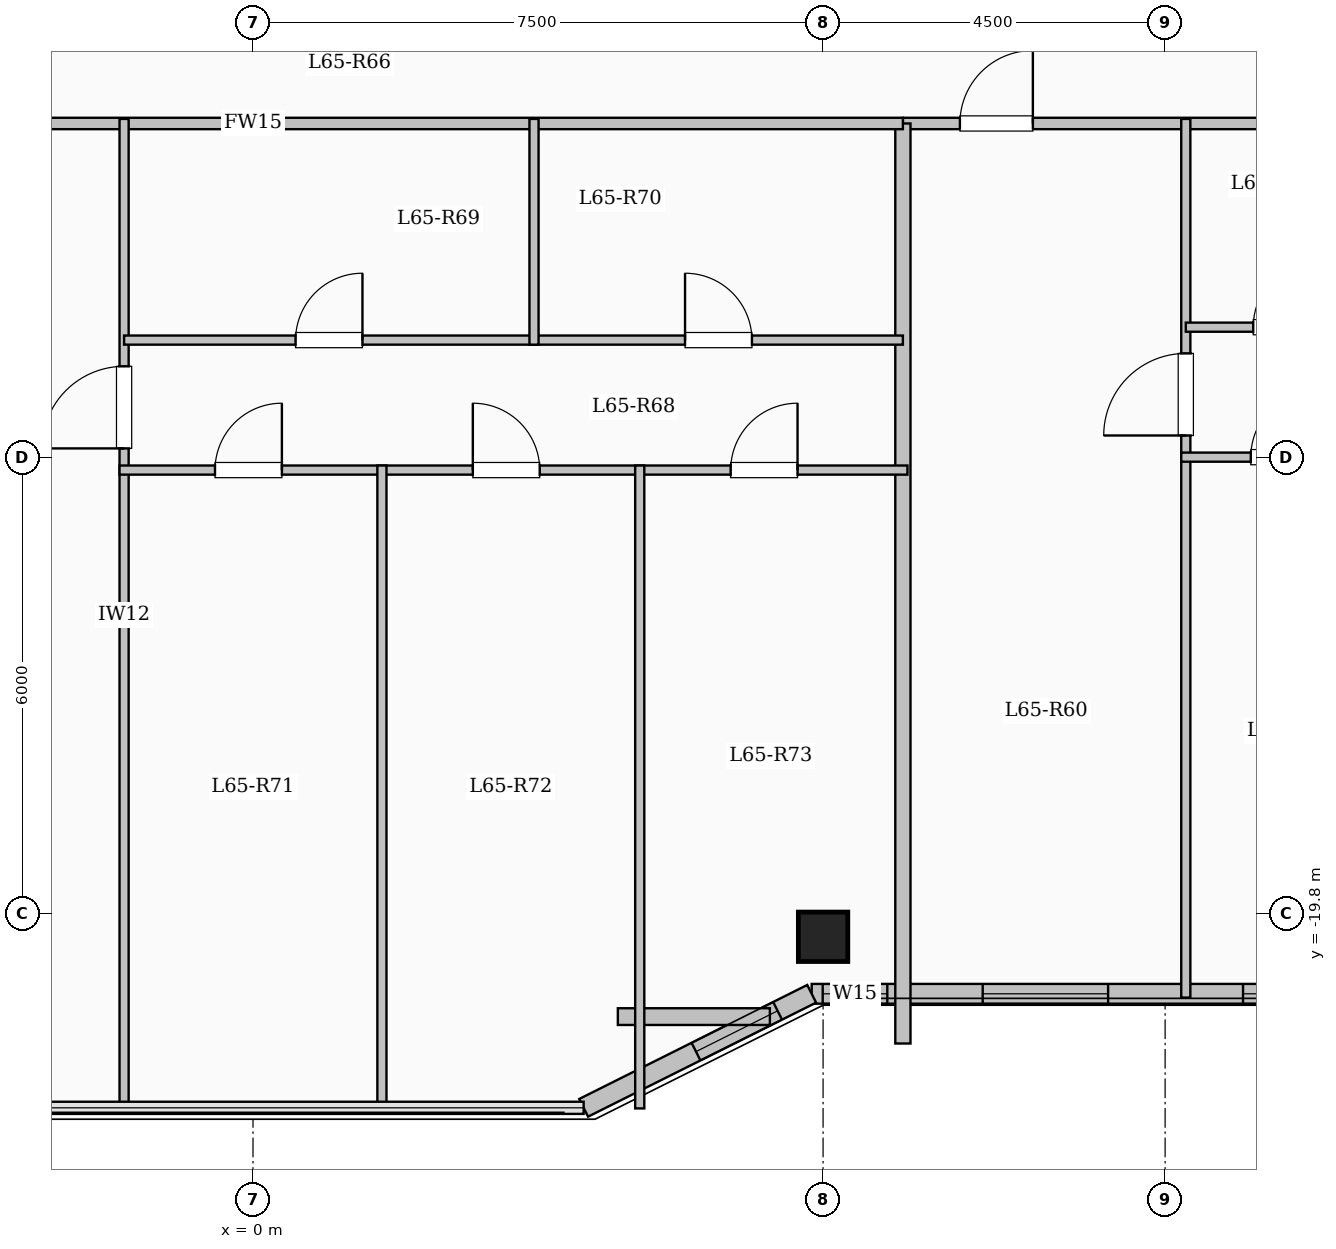
"""IFC4 building model, lengths in metres.
Left out: names, types, materials, properties, quantities, classifications, styles, units other than length and angle.
Written with IfcOpenShell. Run it as: python <this file> out.ifc"""

import sys

from ifc_helpers import new_model, si_unit, direction, frame, frame_2d, origin, origin_2d, place, context, subcontext, project, spatial, rectangle, extrude, element, fill, save


model = new_model("IFC4")
c1 = context("Model", 3, precision=1e-05, world=origin(), true_north=direction((0.0, 1.0)))
c2 = subcontext(c1, "Body", "Model", "MODEL_VIEW")
j1 = project(units=[si_unit("LENGTHUNIT", "METRE"), si_unit("PLANEANGLEUNIT", "RADIAN")], contexts=[c1])
p1 = place(None, origin())
s1 = spatial("IfcSite", under=j1, at=p1, CompositionType="ELEMENT")
p2 = place(p1, origin())
s2 = spatial("IfcBuilding", under=s1, at=p2, CompositionType="ELEMENT")
p3 = place(p2, frame((0.0, 0.0, 241.5)))
s3 = spatial("IfcBuildingStorey", under=s2, at=p3, CompositionType="ELEMENT", Elevation=241.5)
p4 = place(p3, frame((7.5, -20.1, 0.0), z_axis=(0.0, 0.0, 1.0), x_axis=(1.0, 0.0, 0.0)))
e1 = element("IfcColumn", 1, at=p4, inside=s3, PredefinedType="COLUMN", context=c2, shape_type="SweptSolid", body=[
    extrude(rectangle(XDim=0.65, YDim=0.65, at=origin_2d()), origin(), (0.0, 0.0, 1.0), 3.35),
])
p5 = place(p3, frame((17.85, -20.85, 0.0), z_axis=(0.0, 0.0, 1.0), x_axis=(-1.0, 0.0, 0.0)))
e2 = element("IfcWall", 2, at=p5, inside=s3, PredefinedType="SOLIDWALL", context=c2, shape_type="SweptSolid", body=[
    extrude(rectangle(XDim=10.5, YDim=0.26, at=frame_2d((5.25, 0.0))), origin(), (0.0, 0.0, 1.0), 3.1),
])
p6 = place(p5, frame((0.875, 0.0, 0.95)))
e3 = element("IfcOpeningElement", 3, at=p6, cuts=e2, PredefinedType="OPENING", context=c2, shape_type="SweptSolid", body=[
    extrude(rectangle(XDim=1.2, YDim=1.5, at=frame_2d((0.6, 0.75))), frame((0.0, 0.14, 0.0), z_axis=(0.0, -1.0, 0.0), x_axis=(1.0, 0.0, 0.0)), (0.0, 0.0, 1.0), 0.28),
])
p7 = place(p5, frame((3.625, 0.0, 0.95)))
e4 = element("IfcOpeningElement", 4, at=p7, cuts=e2, PredefinedType="OPENING", context=c2, shape_type="SweptSolid", body=[
    extrude(rectangle(XDim=1.2, YDim=1.5, at=frame_2d((0.6, 0.75))), frame((0.0, 0.14, 0.0), z_axis=(0.0, -1.0, 0.0), x_axis=(1.0, 0.0, 0.0)), (0.0, 0.0, 1.0), 0.28),
])
p8 = place(p5, frame((6.6, 0.0, 0.9)))
e5 = element("IfcOpeningElement", 5, at=p8, cuts=e2, PredefinedType="OPENING", context=c2, shape_type="SweptSolid", body=[
    extrude(rectangle(XDim=1.65, YDim=1.6, at=frame_2d((0.825, 0.8))), frame((0.0, 0.14, 0.0), z_axis=(0.0, -1.0, 0.0), x_axis=(1.0, 0.0, 0.0)), (0.0, 0.0, 1.0), 0.28),
])
p9 = place(p5, frame((9.505, 0.0, 0.95)))
e6 = element("IfcOpeningElement", 6, at=p9, cuts=e2, PredefinedType="OPENING", context=c2, shape_type="SweptSolid", body=[
    extrude(rectangle(XDim=0.85, YDim=1.5, at=frame_2d((0.425, 0.75))), frame((0.0, 0.14, 0.0), z_axis=(0.0, -1.0, 0.0), x_axis=(1.0, 0.0, 0.0)), (0.0, 0.0, 1.0), 0.28),
])
p10 = place(p3, frame((7.35, -20.85, 0.0), z_axis=(0.0, 0.0, 1.0), x_axis=(-0.894427191, -0.4472135955, 0.0)))
e7 = element("IfcWall", 7, at=p10, inside=s3, PredefinedType="SOLIDWALL", context=c2, shape_type="SweptSolid", body=[
    extrude(rectangle(XDim=3.354, YDim=0.26, at=frame_2d((1.677, 0.0))), origin(), (0.0, 0.0, 1.0), 3.1),
])
p11 = place(p10, frame((0.501, 0.0, 0.95)))
e8 = element("IfcOpeningElement", 8, at=p11, cuts=e7, PredefinedType="OPENING", context=c2, shape_type="SweptSolid", body=[
    extrude(rectangle(XDim=1.2, YDim=1.5, at=frame_2d((0.6, 0.75))), frame((0.0, 0.14, 0.0), z_axis=(0.0, -1.0, 0.0), x_axis=(1.0, 0.0, 0.0)), (0.0, 0.0, 1.0), 0.28),
])
p12 = place(p3, frame((4.8, -21.15, 0.0), z_axis=(0.0, 0.0, 1.0), x_axis=(1.0, 0.0, 0.0)))
e9 = element("IfcWall", 9, at=p12, inside=s3, PredefinedType="PARAPET", context=c2, shape_type="SweptSolid", body=[
    extrude(rectangle(XDim=2.0, YDim=0.22, at=frame_2d((1.0, 0.0))), origin(), (0.0, 0.0, 1.0), 0.85),
])
p13 = place(p3, frame((8.55, -9.4, 0.0), z_axis=(0.0, 0.0, 1.0), x_axis=(1.0, 0.0, 0.0)))
e10 = element("IfcWall", 10, at=p13, inside=s3, PredefinedType="PARTITIONING", context=c2, shape_type="SweptSolid", body=[
    extrude(rectangle(XDim=9.2, YDim=0.15, at=frame_2d((4.6, 0.0))), origin(), (0.0, 0.0, 1.0), 3.1),
])
p14 = place(p13, frame((0.75, 0.0, 0.0)))
e11 = element("IfcOpeningElement", 11, at=p14, cuts=e10, PredefinedType="OPENING", context=c2, shape_type="SweptSolid", body=[
    extrude(rectangle(XDim=0.96, YDim=2.15, at=frame_2d((0.48, 1.075))), frame((0.0, 0.085, 0.0), z_axis=(0.0, -1.0, 0.0), x_axis=(1.0, 0.0, 0.0)), (0.0, 0.0, 1.0), 0.17),
])
p15 = place(p3, frame((12.272, -20.9, 0.0), z_axis=(0.0, 0.0, 1.0), x_axis=(0.0, 1.0, 0.0)))
e12 = element("IfcWall", 12, at=p15, inside=s3, PredefinedType="PARTITIONING", context=c2, shape_type="SweptSolid", body=[
    extrude(rectangle(XDim=11.56, YDim=0.12, at=frame_2d((5.78, 0.0))), origin(), (0.0, 0.0, 1.0), 3.1),
])
p16 = place(p15, frame((7.395, 0.0, 0.0)))
e13 = element("IfcOpeningElement", 13, at=p16, cuts=e12, PredefinedType="OPENING", context=c2, shape_type="SweptSolid", body=[
    extrude(rectangle(XDim=1.08, YDim=2.15, at=frame_2d((0.54, 1.075))), frame((0.0, 0.07, 0.0), z_axis=(0.0, -1.0, 0.0), x_axis=(1.0, 0.0, 0.0)), (0.0, 0.0, 1.0), 0.14),
])
p17 = place(p3, frame((12.272, -12.08, 0.0), z_axis=(0.0, 0.0, 1.0), x_axis=(1.0, 0.0, 0.0)))
e14 = element("IfcWall", 14, at=p17, inside=s3, PredefinedType="PARTITIONING", context=c2, shape_type="SweptSolid", body=[
    extrude(rectangle(XDim=2.655, YDim=0.12, at=frame_2d((1.328, 0.0))), origin(), (0.0, 0.0, 1.0), 2.785),
])
p18 = place(p17, frame((0.887, 0.0, 0.0)))
e15 = element("IfcOpeningElement", 15, at=p18, cuts=e14, PredefinedType="OPENING", context=c2, shape_type="SweptSolid", body=[
    extrude(rectangle(XDim=0.88, YDim=2.1, at=frame_2d((0.44, 1.05))), frame((0.0, 0.07, 0.0), z_axis=(0.0, -1.0, 0.0), x_axis=(1.0, 0.0, 0.0)), (0.0, 0.0, 1.0), 0.14),
])
p19 = place(p3, frame((12.212, -13.79, 0.0), z_axis=(0.0, 0.0, 1.0), x_axis=(1.0, 0.0, 0.0)))
e16 = element("IfcWall", 16, at=p19, inside=s3, PredefinedType="PARTITIONING", context=c2, shape_type="SweptSolid", body=[
    extrude(rectangle(XDim=5.598, YDim=0.12, at=frame_2d((2.799, 0.0))), origin(), (0.0, 0.0, 1.0), 2.785),
])
p20 = place(p19, frame((0.915, 0.0, 0.0)))
e17 = element("IfcOpeningElement", 17, at=p20, cuts=e16, PredefinedType="OPENING", context=c2, shape_type="SweptSolid", body=[
    extrude(rectangle(XDim=0.88, YDim=2.1, at=frame_2d((0.44, 1.05))), frame((0.0, 0.07, 0.0), z_axis=(0.0, -1.0, 0.0), x_axis=(1.0, 0.0, 0.0)), (0.0, 0.0, 1.0), 0.14),
])
p21 = place(p19, frame((3.624, 0.0, 0.0)))
e18 = element("IfcOpeningElement", 18, at=p21, cuts=e16, PredefinedType="OPENING", context=c2, shape_type="SweptSolid", body=[
    extrude(rectangle(XDim=0.88, YDim=2.1, at=frame_2d((0.44, 1.05))), frame((0.0, 0.07, 0.0), z_axis=(0.0, -1.0, 0.0), x_axis=(1.0, 0.0, 0.0)), (0.0, 0.0, 1.0), 0.14),
])
p22 = place(p3, frame((8.55, -21.504, 0.0), z_axis=(0.0, 0.0, 1.0), x_axis=(0.0, 1.0, 0.0)))
e19 = element("IfcWall", 19, at=p22, inside=s3, PredefinedType="SOLIDWALL", context=c2, shape_type="SweptSolid", body=[
    extrude(rectangle(XDim=12.104, YDim=0.2, at=frame_2d((6.052, 0.0))), origin(), (0.0, 0.0, 1.0), 3.1),
])
p23 = place(p3, frame((-8.55, -9.4, 0.0), z_axis=(0.0, 0.0, 1.0), x_axis=(1.0, 0.0, 0.0)))
e20 = element("IfcWall", 20, at=p23, inside=s3, PredefinedType="PARTITIONING", context=c2, shape_type="SweptSolid", body=[
    extrude(rectangle(XDim=17.1, YDim=0.15, at=frame_2d((8.55, 0.0))), origin(), (0.0, 0.0, 1.0), 3.1),
])
p24 = place(p23, frame((1.75, 0.0, 0.0)))
e21 = element("IfcOpeningElement", 21, at=p24, cuts=e20, PredefinedType="OPENING", context=c2, shape_type="SweptSolid", body=[
    extrude(rectangle(XDim=0.96, YDim=2.15, at=frame_2d((0.48, 1.075))), frame((0.0, 0.085, 0.0), z_axis=(0.0, -1.0, 0.0), x_axis=(1.0, 0.0, 0.0)), (0.0, 0.0, 1.0), 0.17),
])
p25 = place(p3, frame((-1.696, -22.38, 0.0), z_axis=(0.0, 0.0, 1.0), x_axis=(0.0, 1.0, 0.0)))
e22 = element("IfcWall", 22, at=p25, inside=s3, PredefinedType="PARTITIONING", context=c2, shape_type="SweptSolid", body=[
    extrude(rectangle(XDim=13.04, YDim=0.12, at=frame_2d((6.52, 0.0))), origin(), (0.0, 0.0, 1.0), 3.1),
])
p26 = place(p25, frame((8.705, 0.0, 0.0)))
e23 = element("IfcOpeningElement", 23, at=p26, cuts=e22, PredefinedType="OPENING", context=c2, shape_type="SweptSolid", body=[
    extrude(rectangle(XDim=1.08, YDim=2.15, at=frame_2d((0.54, 1.075))), frame((0.0, 0.07, 0.0), z_axis=(0.0, -1.0, 0.0), x_axis=(1.0, 0.0, 0.0)), (0.0, 0.0, 1.0), 0.14),
])
p27 = place(p3, frame((-1.696, -12.25, 0.0), z_axis=(0.0, 0.0, 1.0), x_axis=(1.0, 0.0, 0.0)))
e24 = element("IfcWall", 24, at=p27, inside=s3, PredefinedType="PARTITIONING", context=c2, shape_type="SweptSolid", body=[
    extrude(rectangle(XDim=5.393, YDim=0.12, at=frame_2d((2.697, 0.0))), origin(), (0.0, 0.0, 1.0), 2.785),
])
p28 = place(p27, frame((2.256, 0.0, 0.0)))
e25 = element("IfcOpeningElement", 25, at=p28, cuts=e24, PredefinedType="OPENING", context=c2, shape_type="SweptSolid", body=[
    extrude(rectangle(XDim=0.88, YDim=2.1, at=frame_2d((0.44, 1.05))), frame((0.0, 0.07, 0.0), z_axis=(0.0, -1.0, 0.0), x_axis=(1.0, 0.0, 0.0)), (0.0, 0.0, 1.0), 0.14),
])
p29 = place(p3, frame((3.697, -12.25, 0.0), z_axis=(0.0, 0.0, 1.0), x_axis=(1.0, 0.0, 0.0)))
e26 = element("IfcWall", 26, at=p29, inside=s3, PredefinedType="PARTITIONING", context=c2, shape_type="SweptSolid", body=[
    extrude(rectangle(XDim=4.853, YDim=0.12, at=frame_2d((2.427, 0.0))), origin(), (0.0, 0.0, 1.0), 2.785),
])
p30 = place(p29, frame((1.987, 0.0, 0.0)))
e27 = element("IfcOpeningElement", 27, at=p30, cuts=e26, PredefinedType="OPENING", context=c2, shape_type="SweptSolid", body=[
    extrude(rectangle(XDim=0.88, YDim=2.1, at=frame_2d((0.44, 1.05))), frame((0.0, 0.07, 0.0), z_axis=(0.0, -1.0, 0.0), x_axis=(1.0, 0.0, 0.0)), (0.0, 0.0, 1.0), 0.14),
])
p31 = place(p3, frame((-1.756, -13.96, 0.0), z_axis=(0.0, 0.0, 1.0), x_axis=(1.0, 0.0, 0.0)))
e28 = element("IfcWall", 28, at=p31, inside=s3, PredefinedType="PARTITIONING", context=c2, shape_type="SweptSolid", body=[
    extrude(rectangle(XDim=10.366, YDim=0.12, at=frame_2d((5.183, 0.0))), origin(), (0.0, 0.0, 1.0), 2.785),
])
p32 = place(p31, frame((1.256, 0.0, 0.0)))
e29 = element("IfcOpeningElement", 29, at=p32, cuts=e28, PredefinedType="OPENING", context=c2, shape_type="SweptSolid", body=[
    extrude(rectangle(XDim=0.88, YDim=2.1, at=frame_2d((0.44, 1.05))), frame((0.0, 0.07, 0.0), z_axis=(0.0, -1.0, 0.0), x_axis=(1.0, 0.0, 0.0)), (0.0, 0.0, 1.0), 0.14),
])
p33 = place(p31, frame((4.648, 0.0, 0.0)))
e30 = element("IfcOpeningElement", 30, at=p33, cuts=e28, PredefinedType="OPENING", context=c2, shape_type="SweptSolid", body=[
    extrude(rectangle(XDim=0.88, YDim=2.1, at=frame_2d((0.44, 1.05))), frame((0.0, 0.07, 0.0), z_axis=(0.0, -1.0, 0.0), x_axis=(1.0, 0.0, 0.0)), (0.0, 0.0, 1.0), 0.14),
])
p34 = place(p31, frame((8.04, 0.0, 0.0)))
e31 = element("IfcOpeningElement", 31, at=p34, cuts=e28, PredefinedType="OPENING", context=c2, shape_type="SweptSolid", body=[
    extrude(rectangle(XDim=0.88, YDim=2.1, at=frame_2d((0.44, 1.05))), frame((0.0, 0.07, 0.0), z_axis=(0.0, -1.0, 0.0), x_axis=(1.0, 0.0, 0.0)), (0.0, 0.0, 1.0), 0.14),
])
p35 = place(p3, frame((3.697, -12.31, 0.0), z_axis=(0.0, 0.0, 1.0), x_axis=(0.0, 1.0, 0.0)))
e32 = element("IfcWall", 32, at=p35, inside=s3, PredefinedType="PARTITIONING", context=c2, shape_type="SweptSolid", body=[
    extrude(rectangle(XDim=2.97, YDim=0.12, at=frame_2d((1.485, 0.0))), origin(), (0.0, 0.0, 1.0), 3.1),
])
p36 = place(p3, frame((1.696, -22.38, 0.0), z_axis=(0.0, 0.0, 1.0), x_axis=(0.0, 1.0, 0.0)))
e33 = element("IfcWall", 33, at=p36, inside=s3, PredefinedType="PARTITIONING", context=c2, shape_type="SweptSolid", body=[
    extrude(rectangle(XDim=8.48, YDim=0.12, at=frame_2d((4.24, 0.0))), origin(), (0.0, 0.0, 1.0), 3.1),
])
p37 = place(p3, frame((5.088, -22.358, 0.0), z_axis=(0.0, 0.0, 1.0), x_axis=(0.0, 1.0, 0.0)))
e34 = element("IfcWall", 34, at=p37, inside=s3, PredefinedType="PARTITIONING", context=c2, shape_type="SweptSolid", body=[
    extrude(rectangle(XDim=8.458, YDim=0.12, at=frame_2d((4.229, 0.0))), origin(), (0.0, 0.0, 1.0), 3.1),
])
p38 = place(p7, origin())
e35 = element("IfcWindow", 35, at=p38, inside=s3, PartitioningType="SINGLE_PANEL", PredefinedType="WINDOW", context=c2, shape_type="SweptSolid", body=[
    extrude(rectangle(XDim=1.2, YDim=1.5, at=frame_2d((0.6, 0.75))), frame((0.0, 0.03, 0.0), z_axis=(0.0, -1.0, 0.0), x_axis=(1.0, 0.0, 0.0)), (0.0, 0.0, 1.0), 0.06),
])
fill(e4, e35)
p39 = place(p8, origin())
e36 = element("IfcWindow", 36, at=p39, inside=s3, PartitioningType="SINGLE_PANEL", PredefinedType="WINDOW", context=c2, shape_type="SweptSolid", body=[
    extrude(rectangle(XDim=1.65, YDim=1.6, at=frame_2d((0.825, 0.8))), frame((0.0, 0.03, 0.0), z_axis=(0.0, -1.0, 0.0), x_axis=(1.0, 0.0, 0.0)), (0.0, 0.0, 1.0), 0.06),
])
fill(e5, e36)
p40 = place(p9, origin())
e37 = element("IfcWindow", 37, at=p40, inside=s3, PartitioningType="SINGLE_PANEL", PredefinedType="WINDOW", context=c2, shape_type="SweptSolid", body=[
    extrude(rectangle(XDim=0.85, YDim=1.5, at=frame_2d((0.425, 0.75))), frame((0.0, 0.03, 0.0), z_axis=(0.0, -1.0, 0.0), x_axis=(1.0, 0.0, 0.0)), (0.0, 0.0, 1.0), 0.06),
])
fill(e6, e37)
p41 = place(p11, origin())
e38 = element("IfcWindow", 38, at=p41, inside=s3, PartitioningType="SINGLE_PANEL", PredefinedType="WINDOW", context=c2, shape_type="SweptSolid", body=[
    extrude(rectangle(XDim=1.2, YDim=1.5, at=frame_2d((0.6, 0.75))), frame((0.0, 0.03, 0.0), z_axis=(0.0, -1.0, 0.0), x_axis=(1.0, 0.0, 0.0)), (0.0, 0.0, 1.0), 0.06),
])
fill(e8, e38)
p42 = place(p14, origin())
e39 = element("IfcDoor", 39, at=p42, inside=s3, OperationType="SINGLE_SWING_RIGHT", PredefinedType="DOOR", context=c2, shape_type="SweptSolid", body=[
    extrude(rectangle(XDim=0.96, YDim=2.15, at=frame_2d((0.48, 1.075))), frame((0.0, 0.025, 0.0), z_axis=(0.0, -1.0, 0.0), x_axis=(1.0, 0.0, 0.0)), (0.0, 0.0, 1.0), 0.05),
])
fill(e11, e39)
p43 = place(p16, origin())
e40 = element("IfcDoor", 40, at=p43, inside=s3, OperationType="SINGLE_SWING_LEFT", PredefinedType="DOOR", context=c2, shape_type="SweptSolid", body=[
    extrude(rectangle(XDim=1.08, YDim=2.15, at=frame_2d((0.54, 1.075))), frame((0.0, 0.025, 0.0), z_axis=(0.0, -1.0, 0.0), x_axis=(1.0, 0.0, 0.0)), (0.0, 0.0, 1.0), 0.05),
])
fill(e13, e40)
p44 = place(p18, origin())
e41 = element("IfcDoor", 41, at=p44, inside=s3, OperationType="SINGLE_SWING_RIGHT", PredefinedType="DOOR", context=c2, shape_type="SweptSolid", body=[
    extrude(rectangle(XDim=0.88, YDim=2.1, at=frame_2d((0.44, 1.05))), frame((0.0, 0.025, 0.0), z_axis=(0.0, -1.0, 0.0), x_axis=(1.0, 0.0, 0.0)), (0.0, 0.0, 1.0), 0.05),
])
fill(e15, e41)
p45 = place(p20, origin())
e42 = element("IfcDoor", 42, at=p45, inside=s3, OperationType="SINGLE_SWING_RIGHT", PredefinedType="DOOR", context=c2, shape_type="SweptSolid", body=[
    extrude(rectangle(XDim=0.88, YDim=2.1, at=frame_2d((0.44, 1.05))), frame((0.0, 0.025, 0.0), z_axis=(0.0, -1.0, 0.0), x_axis=(1.0, 0.0, 0.0)), (0.0, 0.0, 1.0), 0.05),
])
fill(e17, e42)
p46 = place(p26, origin())
e43 = element("IfcDoor", 43, at=p46, inside=s3, OperationType="SINGLE_SWING_LEFT", PredefinedType="DOOR", context=c2, shape_type="SweptSolid", body=[
    extrude(rectangle(XDim=1.08, YDim=2.15, at=frame_2d((0.54, 1.075))), frame((0.0, 0.025, 0.0), z_axis=(0.0, -1.0, 0.0), x_axis=(1.0, 0.0, 0.0)), (0.0, 0.0, 1.0), 0.05),
])
fill(e23, e43)
p47 = place(p28, origin())
e44 = element("IfcDoor", 44, at=p47, inside=s3, OperationType="SINGLE_SWING_RIGHT", PredefinedType="DOOR", context=c2, shape_type="SweptSolid", body=[
    extrude(rectangle(XDim=0.88, YDim=2.1, at=frame_2d((0.44, 1.05))), frame((0.0, 0.025, 0.0), z_axis=(0.0, -1.0, 0.0), x_axis=(1.0, 0.0, 0.0)), (0.0, 0.0, 1.0), 0.05),
])
fill(e25, e44)
p48 = place(p30, origin())
e45 = element("IfcDoor", 45, at=p48, inside=s3, OperationType="SINGLE_SWING_LEFT", PredefinedType="DOOR", context=c2, shape_type="SweptSolid", body=[
    extrude(rectangle(XDim=0.88, YDim=2.1, at=frame_2d((0.44, 1.05))), frame((0.0, 0.025, 0.0), z_axis=(0.0, -1.0, 0.0), x_axis=(1.0, 0.0, 0.0)), (0.0, 0.0, 1.0), 0.05),
])
fill(e27, e45)
p49 = place(p32, origin())
e46 = element("IfcDoor", 46, at=p49, inside=s3, OperationType="SINGLE_SWING_RIGHT", PredefinedType="DOOR", context=c2, shape_type="SweptSolid", body=[
    extrude(rectangle(XDim=0.88, YDim=2.1, at=frame_2d((0.44, 1.05))), frame((0.0, 0.025, 0.0), z_axis=(0.0, -1.0, 0.0), x_axis=(1.0, 0.0, 0.0)), (0.0, 0.0, 1.0), 0.05),
])
fill(e29, e46)
p50 = place(p33, origin())
e47 = element("IfcDoor", 47, at=p50, inside=s3, OperationType="SINGLE_SWING_LEFT", PredefinedType="DOOR", context=c2, shape_type="SweptSolid", body=[
    extrude(rectangle(XDim=0.88, YDim=2.1, at=frame_2d((0.44, 1.05))), frame((0.0, 0.025, 0.0), z_axis=(0.0, -1.0, 0.0), x_axis=(1.0, 0.0, 0.0)), (0.0, 0.0, 1.0), 0.05),
])
fill(e30, e47)
p51 = place(p34, origin())
e48 = element("IfcDoor", 48, at=p51, inside=s3, OperationType="SINGLE_SWING_RIGHT", PredefinedType="DOOR", context=c2, shape_type="SweptSolid", body=[
    extrude(rectangle(XDim=0.88, YDim=2.1, at=frame_2d((0.44, 1.05))), frame((0.0, 0.025, 0.0), z_axis=(0.0, -1.0, 0.0), x_axis=(1.0, 0.0, 0.0)), (0.0, 0.0, 1.0), 0.05),
])
fill(e31, e48)
save(model, sys.argv[1])
